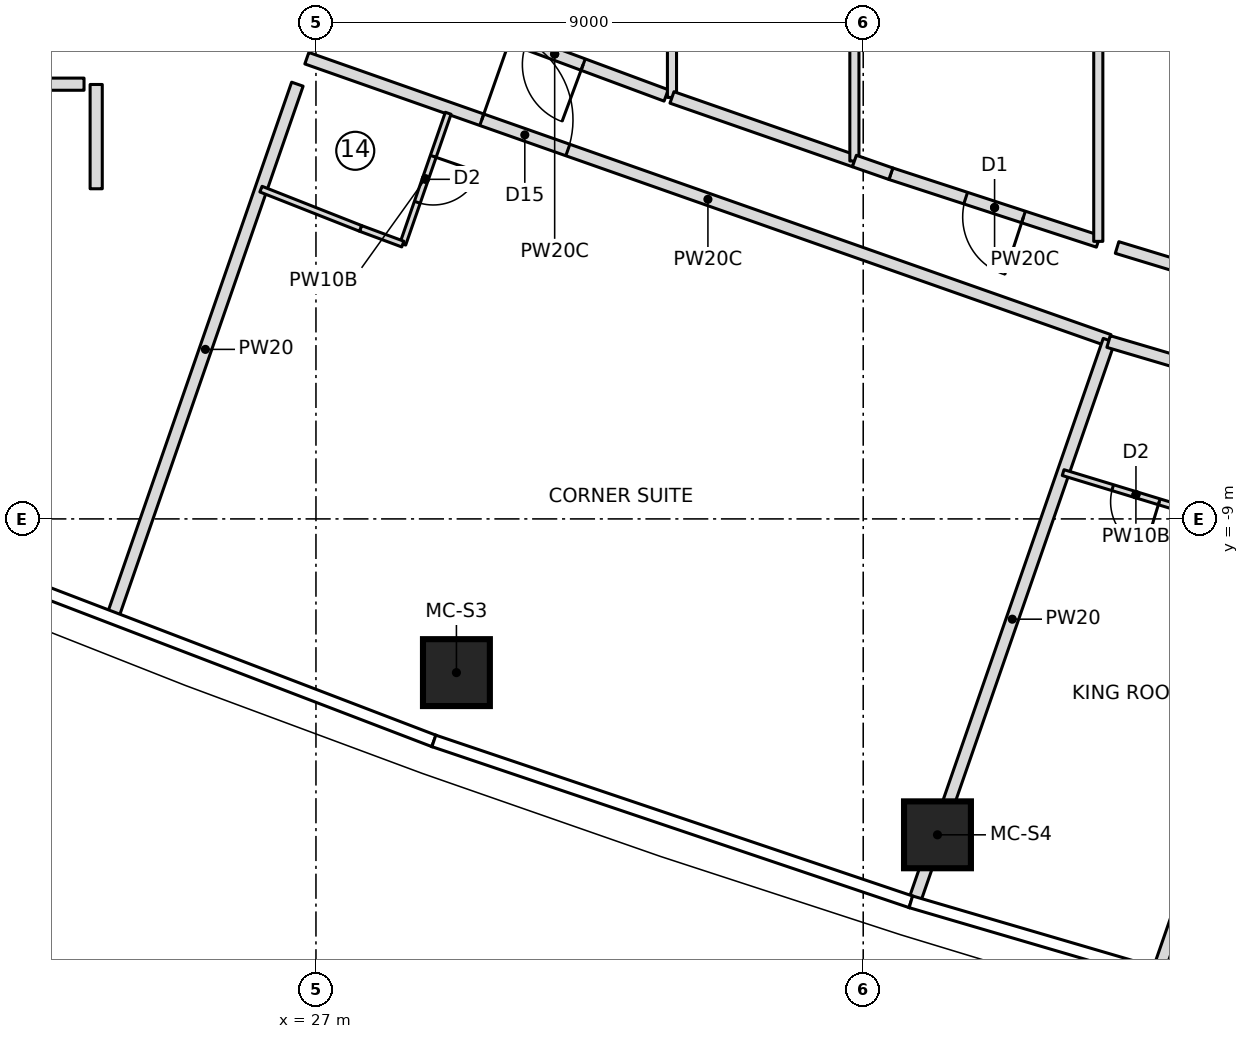
"""IFC4 building model, lengths in metres.
Left out: names, types, materials, properties, quantities, classifications, styles, units other than length and angle.
Written with IfcOpenShell. Run it as: python <this file> out.ifc"""

import sys

from ifc_helpers import new_model, si_unit, direction, frame, frame_2d, origin, origin_2d, place, context, subcontext, project, spatial, rectangle, extrude, element, fill, save


model = new_model("IFC4")
c1 = context("Model", 3, precision=1e-05, world=origin(), true_north=direction((0.0, 1.0)))
c2 = subcontext(c1, "Body", "Model", "MODEL_VIEW")
j1 = project(units=[si_unit("LENGTHUNIT", "METRE"), si_unit("PLANEANGLEUNIT", "RADIAN")], contexts=[c1])
p1 = place(None, origin())
s1 = spatial("IfcSite", under=j1, at=p1, CompositionType="ELEMENT")
p2 = place(p1, origin())
s2 = spatial("IfcBuilding", under=s1, at=p2, CompositionType="ELEMENT")
p3 = place(p2, frame((0.0, 0.0, 296.3)))
s3 = spatial("IfcBuildingStorey", under=s2, at=p3, CompositionType="ELEMENT", Elevation=296.3)
for number, where, z_axis, x_axis in (
    (1, (29.31, -11.528, 0.0), (0.0, 0.0, 1.0), (1.0, 0.0, 0.0)),
    (2, (37.221, -14.196, 0.0), (0.0, 0.0, 1.0), (1.0, 0.0, 0.0)),
):
    element("IfcColumn", number, at=place(p3, frame(where, z_axis=z_axis, x_axis=x_axis)), inside=s3, PredefinedType="COLUMN", context=c2, shape_type="SweptSolid", body=[
        extrude(rectangle(XDim=1.1, YDim=1.1, at=origin_2d()), origin(), (0.0, 0.0, 1.0), 3.55),
    ])
p4 = place(p3, frame((13.637, -1.85, 0.0), z_axis=(0.0, 0.0, 1.0), x_axis=(1.0, 0.0, 0.0)))
e3 = element("IfcWall", 3, at=p4, inside=s3, PredefinedType="PARTITIONING", context=c2, shape_type="SweptSolid", body=[
    extrude(rectangle(XDim=9.549, YDim=0.2, at=frame_2d((4.774, 0.0))), origin(), (0.0, 0.0, 1.0), 3.25),
])
p5 = place(p4, frame((4.274, 0.0, 0.0)))
e4 = element("IfcOpeningElement", 4, at=p5, cuts=e3, PredefinedType="OPENING", context=c2, shape_type="SweptSolid", body=[
    extrude(rectangle(XDim=1.0, YDim=2.1, at=frame_2d((0.5, 1.05))), frame((0.0, 0.11, 0.0), z_axis=(0.0, -1.0, 0.0), x_axis=(1.0, 0.0, 0.0)), (0.0, 0.0, 1.0), 0.22),
])
p6 = place(p3, frame((23.668, -10.573, 0.0), z_axis=(0.0, 0.0, 1.0), x_axis=(0.327714422317, 0.944776829418, 0.0)))
e5 = element("IfcWall", 5, at=p6, inside=s3, PredefinedType="PARTITIONING", context=c2, shape_type="SweptSolid", body=[
    extrude(rectangle(XDim=9.233, YDim=0.2, at=frame_2d((4.617, 0.0))), origin(), (0.0, 0.0, 1.0), 3.25),
])
p7 = place(p3, frame((26.85, -1.423, 0.0), z_axis=(0.0, 0.0, 1.0), x_axis=(0.943328585164, -0.331860182022, 0.0)))
e6 = element("IfcWall", 6, at=p7, inside=s3, PredefinedType="PARTITIONING", context=c2, shape_type="SweptSolid", body=[
    extrude(rectangle(XDim=13.984, YDim=0.2, at=frame_2d((6.992, 0.0))), origin(), (0.0, 0.0, 1.0), 3.25),
])
p8 = place(p7, frame((3.05, 0.0, 0.0)))
e7 = element("IfcOpeningElement", 7, at=p8, cuts=e6, PredefinedType="OPENING", context=c2, shape_type="SweptSolid", body=[
    extrude(rectangle(XDim=1.5, YDim=2.1, at=frame_2d((0.75, 1.05))), frame((0.0, 0.11, 0.0), z_axis=(0.0, -1.0, 0.0), x_axis=(1.0, 0.0, 0.0)), (0.0, 0.0, 1.0), 0.22),
])
p9 = place(p3, frame((29.175, -2.328, 0.0), z_axis=(0.0, 0.0, 1.0), x_axis=(-0.327718024288, -0.944775579996, 0.0)))
e8 = element("IfcWall", 8, at=p9, inside=s3, PredefinedType="PARTITIONING", context=c2, shape_type="SweptSolid", body=[
    extrude(rectangle(XDim=2.277, YDim=0.1, at=frame_2d((1.139, 0.0))), origin(), (0.0, 0.0, 1.0), 3.25),
])
p10 = place(p9, frame((0.75, 0.0, 0.0)))
e9 = element("IfcOpeningElement", 9, at=p10, cuts=e8, PredefinedType="OPENING", context=c2, shape_type="SweptSolid", body=[
    extrude(rectangle(XDim=0.8, YDim=2.1, at=frame_2d((0.4, 1.05))), frame((0.0, 0.06, 0.0), z_axis=(0.0, -1.0, 0.0), x_axis=(1.0, 0.0, 0.0)), (0.0, 0.0, 1.0), 0.12),
])
p11 = place(p3, frame((28.428, -4.48, 0.0), z_axis=(0.0, 0.0, 1.0), x_axis=(-0.937514267289, 0.347946833049, 0.0)))
e10 = element("IfcWall", 10, at=p11, inside=s3, PredefinedType="PARTITIONING", context=c2, shape_type="SweptSolid", body=[
    extrude(rectangle(XDim=0.742, YDim=0.1, at=frame_2d((0.371, 0.0))), origin(), (0.0, 0.0, 1.0), 3.25),
])
p12 = place(p3, frame((27.733, -4.222, 0.0), z_axis=(0.0, 0.0, 1.0), x_axis=(-0.930254925629, 0.366913850028, 0.0)))
e11 = element("IfcWall", 11, at=p12, inside=s3, PredefinedType="PARTITIONING", context=c2, shape_type="SweptSolid", body=[
    extrude(rectangle(XDim=1.76, YDim=0.1, at=frame_2d((0.88, 0.0))), origin(), (0.0, 0.0, 1.0), 3.25),
])
p13 = place(p3, frame((36.861, -15.235, 0.0), z_axis=(0.0, 0.0, 1.0), x_axis=(0.327710853631, 0.944778067279, 0.0)))
e12 = element("IfcWall", 12, at=p13, inside=s3, PredefinedType="PARTITIONING", context=c2, shape_type="SweptSolid", body=[
    extrude(rectangle(XDim=9.707, YDim=0.2, at=frame_2d((4.854, 0.0))), origin(), (0.0, 0.0, 1.0), 3.25),
])
p14 = place(p3, frame((40.035, -6.083, 0.0), z_axis=(0.0, 0.0, 1.0), x_axis=(0.958901312153, -0.283739799027, 0.0)))
e13 = element("IfcWall", 13, at=p14, inside=s3, PredefinedType="PARTITIONING", context=c2, shape_type="SweptSolid", body=[
    extrude(rectangle(XDim=4.174, YDim=0.2, at=frame_2d((2.087, 0.0))), origin(), (0.0, 0.0, 1.0), 3.25),
])
p15 = place(p14, frame((3.05, 0.0, 0.0)))
e14 = element("IfcOpeningElement", 14, at=p15, cuts=e13, PredefinedType="OPENING", context=c2, shape_type="SweptSolid", body=[
    extrude(rectangle(XDim=1.0, YDim=2.1, at=frame_2d((0.5, 1.05))), frame((0.0, 0.11, 0.0), z_axis=(0.0, -1.0, 0.0), x_axis=(1.0, 0.0, 0.0)), (0.0, 0.0, 1.0), 0.22),
])
p16 = place(p3, frame((41.681, -8.966, 0.0), z_axis=(0.0, 0.0, 1.0), x_axis=(-0.956723503196, 0.290998519638, 0.0)))
e15 = element("IfcWall", 15, at=p16, inside=s3, PredefinedType="PARTITIONING", context=c2, shape_type="SweptSolid", body=[
    extrude(rectangle(XDim=2.502, YDim=0.1, at=frame_2d((1.251, 0.0))), origin(), (0.0, 0.0, 1.0), 3.25),
])
p17 = place(p16, frame((0.85, 0.0, 0.0)))
e16 = element("IfcOpeningElement", 16, at=p17, cuts=e15, PredefinedType="OPENING", context=c2, shape_type="SweptSolid", body=[
    extrude(rectangle(XDim=0.8, YDim=2.1, at=frame_2d((0.4, 1.05))), frame((0.0, 0.06, 0.0), z_axis=(0.0, -1.0, 0.0), x_axis=(1.0, 0.0, 0.0)), (0.0, 0.0, 1.0), 0.12),
])
p18 = place(p3, frame((40.854, -16.447, 0.0), z_axis=(0.0, 0.0, 1.0), x_axis=(0.327714654767, 0.944776748788, 0.0)))
e17 = element("IfcWall", 17, at=p18, inside=s3, PredefinedType="PARTITIONING", context=c2, shape_type="SweptSolid", body=[
    extrude(rectangle(XDim=9.577, YDim=0.2, at=frame_2d((4.788, 0.0))), origin(), (0.0, 0.0, 1.0), 3.25),
])
p19 = place(p3, frame((32.76, -2.035, 0.0), z_axis=(0.0, 0.0, 1.0), x_axis=(-0.937460178932, 0.348092534992, 0.0)))
e18 = element("IfcWall", 18, at=p19, inside=s3, PredefinedType="PARTITIONING", context=c2, shape_type="SweptSolid", body=[
    extrude(rectangle(XDim=3.913, YDim=0.2, at=frame_2d((1.957, 0.0))), origin(), (0.0, 0.0, 1.0), 3.25),
])
p20 = place(p19, frame((1.457, 0.0, 0.0)))
e19 = element("IfcOpeningElement", 19, at=p20, cuts=e18, PredefinedType="OPENING", context=c2, shape_type="SweptSolid", body=[
    extrude(rectangle(XDim=1.0, YDim=2.1, at=frame_2d((0.5, 1.05))), frame((0.0, 0.11, 0.0), z_axis=(0.0, -1.0, 0.0), x_axis=(1.0, 0.0, 0.0)), (0.0, 0.0, 1.0), 0.22),
])
p21 = place(p3, frame((32.855, -2.068, 0.0), z_axis=(0.0, 0.0, 1.0), x_axis=(0.0, 1.0, 0.0)))
e20 = element("IfcWall", 20, at=p21, inside=s3, PredefinedType="PARTITIONING", context=c2, shape_type="SweptSolid", body=[
    extrude(rectangle(XDim=4.136, YDim=0.15, at=frame_2d((2.068, 0.0))), origin(), (0.0, 0.0, 1.0), 3.25),
])
p22 = place(p3, frame((35.855, -3.114, 0.0), z_axis=(0.0, 0.0, 1.0), x_axis=(-0.944260188635, 0.329200085296, 0.0)))
e21 = element("IfcWall", 21, at=p22, inside=s3, PredefinedType="PARTITIONING", context=c2, shape_type="SweptSolid", body=[
    extrude(rectangle(XDim=3.177, YDim=0.2, at=frame_2d((1.588, 0.0))), origin(), (0.0, 0.0, 1.0), 3.25),
])
p23 = place(p3, frame((35.855, -3.114, 0.0), z_axis=(0.0, 0.0, 1.0), x_axis=(0.0, 1.0, 0.0)))
e22 = element("IfcWall", 22, at=p23, inside=s3, PredefinedType="PARTITIONING", context=c2, shape_type="SweptSolid", body=[
    extrude(rectangle(XDim=6.228, YDim=0.15, at=frame_2d((3.114, 0.0))), origin(), (0.0, 0.0, 1.0), 3.25),
])
p24 = place(p3, frame((39.866, -4.435, 0.0), z_axis=(0.0, 0.0, 1.0), x_axis=(-0.950718067733, 0.310056697535, 0.0)))
e23 = element("IfcWall", 23, at=p24, inside=s3, PredefinedType="PARTITIONING", context=c2, shape_type="SweptSolid", body=[
    extrude(rectangle(XDim=3.588, YDim=0.2, at=frame_2d((1.794, 0.0))), origin(), (0.0, 0.0, 1.0), 3.25),
])
p25 = place(p24, frame((1.294, 0.0, 0.0)))
e24 = element("IfcOpeningElement", 24, at=p25, cuts=e23, PredefinedType="OPENING", context=c2, shape_type="SweptSolid", body=[
    extrude(rectangle(XDim=1.0, YDim=2.1, at=frame_2d((0.5, 1.05))), frame((0.0, 0.11, 0.0), z_axis=(0.0, -1.0, 0.0), x_axis=(1.0, 0.0, 0.0)), (0.0, 0.0, 1.0), 0.22),
])
p26 = place(p3, frame((36.455, -3.323, 0.0), z_axis=(0.0, 0.0, 1.0), x_axis=(-0.944289130413, 0.329117058483, 0.0)))
e25 = element("IfcWall", 25, at=p26, inside=s3, PredefinedType="PARTITIONING", context=c2, shape_type="SweptSolid", body=[
    extrude(rectangle(XDim=0.635, YDim=0.2, at=frame_2d((0.317, 0.0))), origin(), (0.0, 0.0, 1.0), 3.25),
])
p27 = place(p3, frame((39.866, -4.435, 0.0), z_axis=(0.0, 0.0, 1.0), x_axis=(0.0, 1.0, 0.0)))
e26 = element("IfcWall", 26, at=p27, inside=s3, PredefinedType="PARTITIONING", context=c2, shape_type="SweptSolid", body=[
    extrude(rectangle(XDim=8.871, YDim=0.15, at=frame_2d((4.435, 0.0))), origin(), (0.0, 0.0, 1.0), 3.25),
])
p28 = place(p3, frame((42.866, -5.354, 0.0), z_axis=(0.0, 0.0, 1.0), x_axis=(-0.956742178936, 0.290937111838, 0.0)))
e27 = element("IfcWall", 27, at=p28, inside=s3, PredefinedType="PARTITIONING", context=c2, shape_type="SweptSolid", body=[
    extrude(rectangle(XDim=2.813, YDim=0.2, at=frame_2d((1.406, 0.0))), origin(), (0.0, 0.0, 1.0), 3.25),
])
p29 = place(p3, frame((23.386, -1.855, 0.0), z_axis=(0.0, 0.0, 1.0), x_axis=(0.0, -1.0, 0.0)))
e28 = element("IfcWall", 28, at=p29, inside=s3, PredefinedType="PARTITIONING", context=c2, shape_type="SweptSolid", body=[
    extrude(rectangle(XDim=1.715, YDim=0.2, at=frame_2d((0.858, 0.0))), origin(), (0.0, 0.0, 1.0), 3.25),
])
p30 = place(p10, origin())
e29 = element("IfcDoor", 29, at=p30, inside=s3, OperationType="SINGLE_SWING_LEFT", PredefinedType="DOOR", context=c2, shape_type="SweptSolid", body=[
    extrude(rectangle(XDim=0.8, YDim=2.1, at=frame_2d((0.4, 1.05))), frame((0.0, 0.025, 0.0), z_axis=(0.0, -1.0, 0.0), x_axis=(1.0, 0.0, 0.0)), (0.0, 0.0, 1.0), 0.05),
])
fill(e9, e29)
p31 = place(p8, origin())
e30 = element("IfcDoor", 30, at=p31, inside=s3, OperationType="DOUBLE_DOOR_SINGLE_SWING", PredefinedType="DOOR", context=c2, shape_type="SweptSolid", body=[
    extrude(rectangle(XDim=1.5, YDim=2.1, at=frame_2d((0.75, 1.05))), frame((0.0, 0.025, 0.0), z_axis=(0.0, -1.0, 0.0), x_axis=(1.0, 0.0, 0.0)), (0.0, 0.0, 1.0), 0.05),
])
fill(e7, e30)
p32 = place(p17, origin())
e31 = element("IfcDoor", 31, at=p32, inside=s3, OperationType="SINGLE_SWING_LEFT", PredefinedType="DOOR", context=c2, shape_type="SweptSolid", body=[
    extrude(rectangle(XDim=0.8, YDim=2.1, at=frame_2d((0.4, 1.05))), frame((0.0, 0.025, 0.0), z_axis=(0.0, -1.0, 0.0), x_axis=(1.0, 0.0, 0.0)), (0.0, 0.0, 1.0), 0.05),
])
fill(e16, e31)
p33 = place(p20, origin())
e32 = element("IfcDoor", 32, at=p33, inside=s3, OperationType="SINGLE_SWING_LEFT", PredefinedType="DOOR", context=c2, shape_type="SweptSolid", body=[
    extrude(rectangle(XDim=1.0, YDim=2.1, at=frame_2d((0.5, 1.05))), frame((0.0, 0.025, 0.0), z_axis=(0.0, -1.0, 0.0), x_axis=(1.0, 0.0, 0.0)), (0.0, 0.0, 1.0), 0.05),
])
fill(e19, e32)
p34 = place(p25, origin())
e33 = element("IfcDoor", 33, at=p34, inside=s3, OperationType="SINGLE_SWING_LEFT", PredefinedType="DOOR", context=c2, shape_type="SweptSolid", body=[
    extrude(rectangle(XDim=1.0, YDim=2.1, at=frame_2d((0.5, 1.05))), frame((0.0, 0.025, 0.0), z_axis=(0.0, -1.0, 0.0), x_axis=(1.0, 0.0, 0.0)), (0.0, 0.0, 1.0), 0.05),
])
fill(e24, e33)
save(model, sys.argv[1])
